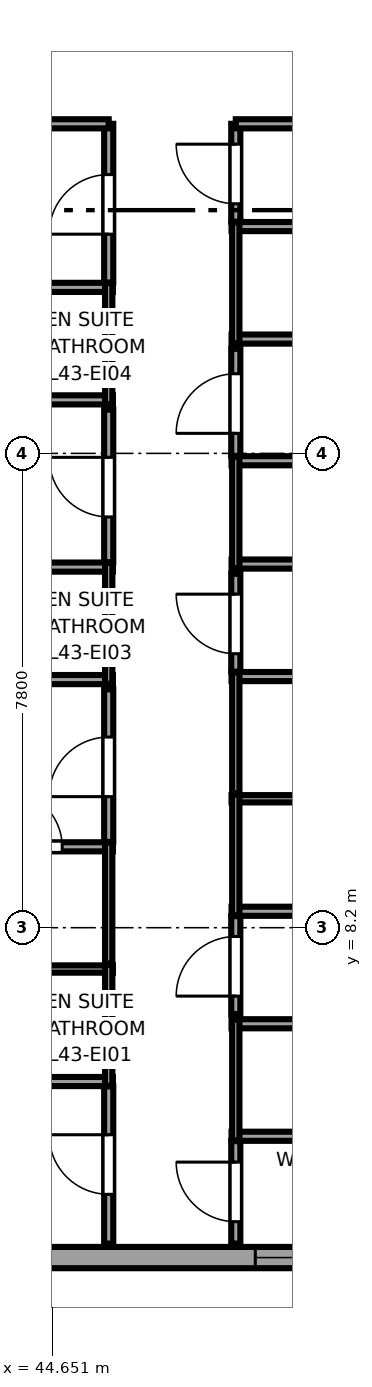
"""IFC4 building model, lengths in metres.
Left out: names, types, materials, properties, quantities, classifications, styles, units other than length and angle.
Written with IfcOpenShell. Run it as: python <this file> out.ifc"""

import sys

from ifc_helpers import new_model, si_unit, direction, frame, frame_2d, origin, place, context, subcontext, project, spatial, rectangle, extrude, source, transform, mapped, element, fill, save


model = new_model("IFC4")
c1 = context("Model", 3, precision=1e-05, world=origin(), true_north=direction((0.0, 1.0)))
c2 = subcontext(c1, "Body", "Model", "MODEL_VIEW")
j1 = project(units=[si_unit("LENGTHUNIT", "METRE"), si_unit("PLANEANGLEUNIT", "RADIAN")], contexts=[c1])
p1 = place(None, origin())
s1 = spatial("IfcSite", under=j1, at=p1, CompositionType="ELEMENT")
p2 = place(p1, origin())
s2 = spatial("IfcBuilding", under=s1, at=p2, CompositionType="ELEMENT")
p3 = place(p2, frame((0.0, 0.0, 164.8)))
s3 = spatial("IfcBuildingStorey", under=s2, at=p3, CompositionType="ELEMENT", Elevation=164.8)
p4 = place(p3, frame((34.375, 2.775, 0.0), z_axis=(0.0, 0.0, 1.0), x_axis=(1.0, 0.0, 0.0)))
e1 = element("IfcWall", 1, at=p4, inside=s3, PredefinedType="SOLIDWALL", context=c2, shape_type="SweptSolid", body=[
    extrude(rectangle(XDim=15.608, YDim=0.35, at=frame_2d((7.804, 0.0))), origin(), (0.0, 0.0, 1.0), 3.37),
])
p5 = place(p4, frame((1.801, 0.0, 0.68)))
e2 = element("IfcOpeningElement", 2, at=p5, cuts=e1, PredefinedType="OPENING", context=c2, shape_type="SweptSolid", body=[
    extrude(rectangle(XDim=2.4, YDim=1.9, at=frame_2d((1.2, 0.95))), frame((0.0, 0.185, 0.0), z_axis=(0.0, -1.0, 0.0), x_axis=(1.0, 0.0, 0.0)), (0.0, 0.0, 1.0), 0.37),
])
p6 = place(p4, frame((13.616, 0.0, 0.62)))
e3 = element("IfcOpeningElement", 3, at=p6, cuts=e1, PredefinedType="OPENING", context=c2, shape_type="SweptSolid", body=[
    extrude(rectangle(XDim=1.5, YDim=1.55, at=frame_2d((0.75, 0.775))), frame((0.0, 0.185, 0.0), z_axis=(0.0, -1.0, 0.0), x_axis=(1.0, 0.0, 0.0)), (0.0, 0.0, 1.0), 0.37),
])
p7 = place(p3, frame((43.06, 5.67, 0.0), z_axis=(0.0, 0.0, 1.0), x_axis=(1.0, 0.0, 0.0)))
e4 = element("IfcWall", 4, at=p7, inside=s3, PredefinedType="PARTITIONING", context=c2, shape_type="SweptSolid", body=[
    extrude(rectangle(XDim=2.59, YDim=0.15, at=frame_2d((1.295, 0.0))), origin(), (0.0, 0.0, 1.0), 3.37),
])
p8 = place(p3, frame((43.06, 7.52, 0.0), z_axis=(0.0, 0.0, 1.0), x_axis=(1.0, 0.0, 0.0)))
e5 = element("IfcWall", 5, at=p8, inside=s3, PredefinedType="PLUMBINGWALL", context=c2, shape_type="SweptSolid", body=[
    extrude(rectangle(XDim=2.59, YDim=0.12, at=frame_2d((1.295, 0.0))), origin(), (0.0, 0.0, 1.0), 3.37),
])
p9 = place(p3, frame((45.58, 5.6, 0.0), z_axis=(0.0, 0.0, 1.0), x_axis=(0.0, 1.0, 0.0)))
e6 = element("IfcWall", 6, at=p9, inside=s3, PredefinedType="PLUMBINGWALL", context=c2, shape_type="SweptSolid", body=[
    extrude(rectangle(XDim=1.99, YDim=0.12, at=frame_2d((0.995, 0.0))), origin(), (0.0, 0.0, 1.0), 3.37),
])
p10 = place(p3, frame((43.06, 9.53, 0.0), z_axis=(0.0, 0.0, 1.0), x_axis=(1.0, 0.0, 0.0)))
e7 = element("IfcWall", 7, at=p10, inside=s3, PredefinedType="PARTITIONING", context=c2, shape_type="SweptSolid", body=[
    extrude(rectangle(XDim=2.59, YDim=0.15, at=frame_2d((1.295, 0.0))), origin(), (0.0, 0.0, 1.0), 3.37),
])
p11 = place(p10, frame((0.835, 0.0, 0.0)))
e8 = element("IfcOpeningElement", 8, at=p11, cuts=e7, PredefinedType="OPENING", context=c2, shape_type="SweptSolid", body=[
    extrude(rectangle(XDim=0.92, YDim=2.01, at=frame_2d((0.46, 1.005))), frame((0.0, 0.085, 0.0), z_axis=(0.0, -1.0, 0.0), x_axis=(1.0, 0.0, 0.0)), (0.0, 0.0, 1.0), 0.17),
])
p12 = place(p3, frame((45.58, 7.61, 0.0), z_axis=(0.0, 0.0, 1.0), x_axis=(0.0, 1.0, 0.0)))
e9 = element("IfcWall", 9, at=p12, inside=s3, PredefinedType="PLUMBINGWALL", context=c2, shape_type="SweptSolid", body=[
    extrude(rectangle(XDim=1.99, YDim=0.12, at=frame_2d((0.995, 0.0))), origin(), (0.0, 0.0, 1.0), 3.001),
])
p13 = place(p3, frame((34.65, 12.28, 0.0), z_axis=(0.0, 0.0, 1.0), x_axis=(1.0, 0.0, 0.0)))
e10 = element("IfcWall", 10, at=p13, inside=s3, PredefinedType="PARTITIONING", context=c2, shape_type="SweptSolid", body=[
    extrude(rectangle(XDim=11.0, YDim=0.15, at=frame_2d((5.5, 0.0))), origin(), (0.0, 0.0, 1.0), 3.37),
])
p14 = place(p3, frame((43.06, 14.13, 0.0), z_axis=(0.0, 0.0, 1.0), x_axis=(1.0, 0.0, 0.0)))
e11 = element("IfcWall", 11, at=p14, inside=s3, PredefinedType="PARTITIONING", context=c2, shape_type="SweptSolid", body=[
    extrude(rectangle(XDim=2.59, YDim=0.15, at=frame_2d((1.295, 0.0))), origin(), (0.0, 0.0, 1.0), 3.37),
])
p15 = place(p3, frame((45.58, 12.21, 0.0), z_axis=(0.0, 0.0, 1.0), x_axis=(0.0, 1.0, 0.0)))
e12 = element("IfcWall", 12, at=p15, inside=s3, PredefinedType="PLUMBINGWALL", context=c2, shape_type="SweptSolid", body=[
    extrude(rectangle(XDim=1.99, YDim=0.12, at=frame_2d((0.995, 0.0))), origin(), (0.0, 0.0, 1.0), 3.001),
])
p16 = place(p3, frame((34.65, 16.88, 0.0), z_axis=(0.0, 0.0, 1.0), x_axis=(1.0, 0.0, 0.0)))
e13 = element("IfcWall", 13, at=p16, inside=s3, PredefinedType="PARTITIONING", context=c2, shape_type="SweptSolid", body=[
    extrude(rectangle(XDim=11.0, YDim=0.15, at=frame_2d((5.5, 0.0))), origin(), (0.0, 0.0, 1.0), 3.37),
])
p17 = place(p3, frame((43.06, 18.73, 0.0), z_axis=(0.0, 0.0, 1.0), x_axis=(1.0, 0.0, 0.0)))
e14 = element("IfcWall", 14, at=p17, inside=s3, PredefinedType="PARTITIONING", context=c2, shape_type="SweptSolid", body=[
    extrude(rectangle(XDim=2.59, YDim=0.15, at=frame_2d((1.295, 0.0))), origin(), (0.0, 0.0, 1.0), 3.37),
])
p18 = place(p3, frame((45.58, 16.81, 0.0), z_axis=(0.0, 0.0, 1.0), x_axis=(0.0, 1.0, 0.0)))
e15 = element("IfcWall", 15, at=p18, inside=s3, PredefinedType="PLUMBINGWALL", context=c2, shape_type="SweptSolid", body=[
    extrude(rectangle(XDim=1.99, YDim=0.12, at=frame_2d((0.995, 0.0))), origin(), (0.0, 0.0, 1.0), 3.001),
])
p19 = place(p3, frame((47.6, 4.77, 0.0), z_axis=(0.0, 0.0, 1.0), x_axis=(1.0, 0.0, 0.0)))
e16 = element("IfcWall", 16, at=p19, inside=s3, PredefinedType="PARTITIONING", context=c2, shape_type="SweptSolid", body=[
    extrude(rectangle(XDim=2.455, YDim=0.15, at=frame_2d((1.228, 0.0))), origin(), (0.0, 0.0, 1.0), 2.832),
])
p20 = place(p3, frame((47.6, 6.62, 0.0), z_axis=(0.0, 0.0, 1.0), x_axis=(1.0, 0.0, 0.0)))
e17 = element("IfcWall", 17, at=p20, inside=s3, PredefinedType="PARTITIONING", context=c2, shape_type="SweptSolid", body=[
    extrude(rectangle(XDim=2.455, YDim=0.15, at=frame_2d((1.228, 0.0))), origin(), (0.0, 0.0, 1.0), 3.37),
])
p21 = place(p3, frame((47.67, 4.7, 0.0), z_axis=(0.0, 0.0, 1.0), x_axis=(0.0, 1.0, 0.0)))
e18 = element("IfcWall", 18, at=p21, inside=s3, PredefinedType="PLUMBINGWALL", context=c2, shape_type="SweptSolid", body=[
    extrude(rectangle(XDim=1.99, YDim=0.12, at=frame_2d((0.995, 0.0))), origin(), (0.0, 0.0, 1.0), 3.37),
])
p22 = place(p3, frame((47.6, 8.47, 0.0), z_axis=(0.0, 0.0, 1.0), x_axis=(1.0, 0.0, 0.0)))
e19 = element("IfcWall", 19, at=p22, inside=s3, PredefinedType="PARTITIONING", context=c2, shape_type="SweptSolid", body=[
    extrude(rectangle(XDim=2.455, YDim=0.15, at=frame_2d((1.228, 0.0))), origin(), (0.0, 0.0, 1.0), 3.37),
])
p23 = place(p3, frame((47.6, 10.32, 0.0), z_axis=(0.0, 0.0, 1.0), x_axis=(1.0, 0.0, 0.0)))
e20 = element("IfcWall", 20, at=p23, inside=s3, PredefinedType="PLUMBINGWALL", context=c2, shape_type="SweptSolid", body=[
    extrude(rectangle(XDim=2.455, YDim=0.12, at=frame_2d((1.228, 0.0))), origin(), (0.0, 0.0, 1.0), 3.37),
])
p24 = place(p3, frame((47.67, 8.4, 0.0), z_axis=(0.0, 0.0, 1.0), x_axis=(0.0, 1.0, 0.0)))
e21 = element("IfcWall", 21, at=p24, inside=s3, PredefinedType="PLUMBINGWALL", context=c2, shape_type="SweptSolid", body=[
    extrude(rectangle(XDim=1.99, YDim=0.12, at=frame_2d((0.995, 0.0))), origin(), (0.0, 0.0, 1.0), 3.37),
])
p25 = place(p3, frame((47.6, 12.33, 0.0), z_axis=(0.0, 0.0, 1.0), x_axis=(1.0, 0.0, 0.0)))
e22 = element("IfcWall", 22, at=p25, inside=s3, PredefinedType="PARTITIONING", context=c2, shape_type="SweptSolid", body=[
    extrude(rectangle(XDim=2.455, YDim=0.15, at=frame_2d((1.228, 0.0))), origin(), (0.0, 0.0, 1.0), 3.37),
])
p26 = place(p3, frame((47.67, 10.41, 0.0), z_axis=(0.0, 0.0, 1.0), x_axis=(0.0, 1.0, 0.0)))
e23 = element("IfcWall", 23, at=p26, inside=s3, PredefinedType="PLUMBINGWALL", context=c2, shape_type="SweptSolid", body=[
    extrude(rectangle(XDim=1.99, YDim=0.12, at=frame_2d((0.995, 0.0))), origin(), (0.0, 0.0, 1.0), 3.37),
])
p27 = place(p3, frame((47.6, 14.18, 0.0), z_axis=(0.0, 0.0, 1.0), x_axis=(1.0, 0.0, 0.0)))
e24 = element("IfcWall", 24, at=p27, inside=s3, PredefinedType="PARTITIONING", context=c2, shape_type="SweptSolid", body=[
    extrude(rectangle(XDim=6.395, YDim=0.15, at=frame_2d((3.198, 0.0))), origin(), (0.0, 0.0, 1.0), 3.37),
])
p28 = place(p3, frame((47.6, 15.879, 0.0), z_axis=(0.0, 0.0, 1.0), x_axis=(1.0, 0.0, 0.0)))
e25 = element("IfcWall", 25, at=p28, inside=s3, PredefinedType="PARTITIONING", context=c2, shape_type="SweptSolid", body=[
    extrude(rectangle(XDim=3.226, YDim=0.15, at=frame_2d((1.613, 0.0))), origin(), (0.0, 0.0, 1.0), 2.758),
])
p29 = place(p3, frame((47.67, 14.11, 0.0), z_axis=(0.0, 0.0, 1.0), x_axis=(0.0, 1.0, 0.0)))
e26 = element("IfcWall", 26, at=p29, inside=s3, PredefinedType="PLUMBINGWALL", context=c2, shape_type="SweptSolid", body=[
    extrude(rectangle(XDim=1.839, YDim=0.12, at=frame_2d((0.919, 0.0))), origin(), (0.0, 0.0, 1.0), 3.37),
])
p30 = place(p3, frame((47.6, 17.88, 0.0), z_axis=(0.0, 0.0, 1.0), x_axis=(1.0, 0.0, 0.0)))
e27 = element("IfcWall", 27, at=p30, inside=s3, PredefinedType="PARTITIONING", context=c2, shape_type="SweptSolid", body=[
    extrude(rectangle(XDim=6.395, YDim=0.15, at=frame_2d((3.198, 0.0))), origin(), (0.0, 0.0, 1.0), 3.37),
])
p31 = place(p3, frame((47.6, 19.73, 0.0), z_axis=(0.0, 0.0, 1.0), x_axis=(1.0, 0.0, 0.0)))
e28 = element("IfcWall", 28, at=p31, inside=s3, PredefinedType="PARTITIONING", context=c2, shape_type="SweptSolid", body=[
    extrude(rectangle(XDim=2.455, YDim=0.15, at=frame_2d((1.228, 0.0))), origin(), (0.0, 0.0, 1.0), 3.37),
])
p32 = place(p3, frame((47.67, 17.81, 0.0), z_axis=(0.0, 0.0, 1.0), x_axis=(0.0, 1.0, 0.0)))
e29 = element("IfcWall", 29, at=p32, inside=s3, PredefinedType="PLUMBINGWALL", context=c2, shape_type="SweptSolid", body=[
    extrude(rectangle(XDim=1.99, YDim=0.12, at=frame_2d((0.995, 0.0))), origin(), (0.0, 0.0, 1.0), 3.37),
])
p33 = place(p3, frame((45.58, 3.005, 0.0), z_axis=(0.0, 0.0, 1.0), x_axis=(0.0, 1.0, 0.0)))
e30 = element("IfcWall", 30, at=p33, inside=s3, PredefinedType="PARTITIONING", context=c2, shape_type="SweptSolid", body=[
    extrude(rectangle(XDim=2.585, YDim=0.15, at=frame_2d((1.292, 0.0))), origin(), (0.0, 0.0, 1.0), 3.37),
])
p34 = place(p33, frame((0.81, 0.0, 0.0)))
e31 = element("IfcOpeningElement", 31, at=p34, cuts=e30, PredefinedType="OPENING", context=c2, shape_type="SweptSolid", body=[
    extrude(rectangle(XDim=0.98, YDim=2.12, at=frame_2d((0.49, 1.06))), frame((0.0, 0.085, 0.0), z_axis=(0.0, -1.0, 0.0), x_axis=(1.0, 0.0, 0.0)), (0.0, 0.0, 1.0), 0.17),
])
p35 = place(p3, frame((45.58, 9.61, 0.0), z_axis=(0.0, 0.0, 1.0), x_axis=(0.0, 1.0, 0.0)))
e32 = element("IfcWall", 32, at=p35, inside=s3, PredefinedType="PARTITIONING", context=c2, shape_type="SweptSolid", body=[
    extrude(rectangle(XDim=2.51, YDim=0.15, at=frame_2d((1.255, 0.0))), origin(), (0.0, 0.0, 1.0), 3.001),
])
p36 = place(p35, frame((0.745, 0.0, 0.0)))
e33 = element("IfcOpeningElement", 33, at=p36, cuts=e32, PredefinedType="OPENING", context=c2, shape_type="SweptSolid", body=[
    extrude(rectangle(XDim=0.98, YDim=2.12, at=frame_2d((0.49, 1.06))), frame((0.0, 0.085, 0.0), z_axis=(0.0, -1.0, 0.0), x_axis=(1.0, 0.0, 0.0)), (0.0, 0.0, 1.0), 0.17),
])
p37 = place(p3, frame((45.58, 14.21, 0.0), z_axis=(0.0, 0.0, 1.0), x_axis=(0.0, 1.0, 0.0)))
e34 = element("IfcWall", 34, at=p37, inside=s3, PredefinedType="PARTITIONING", context=c2, shape_type="SweptSolid", body=[
    extrude(rectangle(XDim=2.51, YDim=0.15, at=frame_2d((1.255, 0.0))), origin(), (0.0, 0.0, 1.0), 3.001),
])
p38 = place(p37, frame((0.745, 0.0, 0.0)))
e35 = element("IfcOpeningElement", 35, at=p38, cuts=e34, PredefinedType="OPENING", context=c2, shape_type="SweptSolid", body=[
    extrude(rectangle(XDim=0.98, YDim=2.12, at=frame_2d((0.49, 1.06))), frame((0.0, 0.085, 0.0), z_axis=(0.0, -1.0, 0.0), x_axis=(1.0, 0.0, 0.0)), (0.0, 0.0, 1.0), 0.17),
])
p39 = place(p3, frame((45.58, 18.81, 0.0), z_axis=(0.0, 0.0, 1.0), x_axis=(0.0, 1.0, 0.0)))
e36 = element("IfcWall", 36, at=p39, inside=s3, PredefinedType="PARTITIONING", context=c2, shape_type="SweptSolid", body=[
    extrude(rectangle(XDim=2.61, YDim=0.15, at=frame_2d((1.305, 0.0))), origin(), (0.0, 0.0, 1.0), 3.001),
])
p40 = place(p39, frame((0.795, 0.0, 0.0)))
e37 = element("IfcOpeningElement", 37, at=p40, cuts=e36, PredefinedType="OPENING", context=c2, shape_type="SweptSolid", body=[
    extrude(rectangle(XDim=0.98, YDim=2.12, at=frame_2d((0.49, 1.06))), frame((0.0, 0.085, 0.0), z_axis=(0.0, -1.0, 0.0), x_axis=(1.0, 0.0, 0.0)), (0.0, 0.0, 1.0), 0.17),
])
p41 = place(p3, frame((34.65, 21.42, 0.0), z_axis=(0.0, 0.0, 1.0), x_axis=(1.0, 0.0, 0.0)))
e38 = element("IfcWall", 38, at=p41, inside=s3, PredefinedType="PARTITIONING", context=c2, shape_type="SweptSolid", body=[
    extrude(rectangle(XDim=10.93, YDim=0.15, at=frame_2d((5.465, 0.0))), origin(), (0.0, 0.0, 1.0), 3.37),
])
p42 = place(p3, frame((47.67, 3.005, 0.0), z_axis=(0.0, 0.0, 1.0), x_axis=(0.0, 1.0, 0.0)))
e39 = element("IfcWall", 39, at=p42, inside=s3, PredefinedType="PARTITIONING", context=c2, shape_type="SweptSolid", body=[
    extrude(rectangle(XDim=1.685, YDim=0.15, at=frame_2d((0.843, 0.0))), origin(), (0.0, 0.0, 1.0), 3.37),
])
p43 = place(p42, frame((0.36, 0.0, 0.0)))
e40 = element("IfcOpeningElement", 40, at=p43, cuts=e39, PredefinedType="OPENING", context=c2, shape_type="SweptSolid", body=[
    extrude(rectangle(XDim=0.98, YDim=2.12, at=frame_2d((0.49, 1.06))), frame((0.0, 0.085, 0.0), z_axis=(0.0, -1.0, 0.0), x_axis=(1.0, 0.0, 0.0)), (0.0, 0.0, 1.0), 0.17),
])
p44 = place(p3, frame((47.67, 6.78, 0.0), z_axis=(0.0, 0.0, 1.0), x_axis=(0.0, 1.0, 0.0)))
e41 = element("IfcWall", 41, at=p44, inside=s3, PredefinedType="PARTITIONING", context=c2, shape_type="SweptSolid", body=[
    extrude(rectangle(XDim=1.61, YDim=0.15, at=frame_2d((0.805, 0.0))), origin(), (0.0, 0.0, 1.0), 3.37),
])
p45 = place(p44, frame((0.295, 0.0, 0.0)))
e42 = element("IfcOpeningElement", 42, at=p45, cuts=e41, PredefinedType="OPENING", context=c2, shape_type="SweptSolid", body=[
    extrude(rectangle(XDim=0.98, YDim=2.12, at=frame_2d((0.49, 1.06))), frame((0.0, 0.085, 0.0), z_axis=(0.0, -1.0, 0.0), x_axis=(1.0, 0.0, 0.0)), (0.0, 0.0, 1.0), 0.17),
])
p46 = place(p3, frame((47.67, 12.41, 0.0), z_axis=(0.0, 0.0, 1.0), x_axis=(0.0, 1.0, 0.0)))
e43 = element("IfcWall", 43, at=p46, inside=s3, PredefinedType="PARTITIONING", context=c2, shape_type="SweptSolid", body=[
    extrude(rectangle(XDim=1.61, YDim=0.15, at=frame_2d((0.805, 0.0))), origin(), (0.0, 0.0, 1.0), 3.37),
])
p47 = place(p46, frame((0.295, 0.0, 0.0)))
e44 = element("IfcOpeningElement", 44, at=p47, cuts=e43, PredefinedType="OPENING", context=c2, shape_type="SweptSolid", body=[
    extrude(rectangle(XDim=0.98, YDim=2.12, at=frame_2d((0.49, 1.06))), frame((0.0, 0.085, 0.0), z_axis=(0.0, -1.0, 0.0), x_axis=(1.0, 0.0, 0.0)), (0.0, 0.0, 1.0), 0.17),
])
p48 = place(p3, frame((47.67, 15.959, 0.0), z_axis=(0.0, 0.0, 1.0), x_axis=(0.0, 1.0, 0.0)))
e45 = element("IfcWall", 45, at=p48, inside=s3, PredefinedType="PARTITIONING", context=c2, shape_type="SweptSolid", body=[
    extrude(rectangle(XDim=1.761, YDim=0.15, at=frame_2d((0.88, 0.0))), origin(), (0.0, 0.0, 1.0), 3.37),
])
p49 = place(p48, frame((0.371, 0.0, 0.0)))
e46 = element("IfcOpeningElement", 46, at=p49, cuts=e45, PredefinedType="OPENING", context=c2, shape_type="SweptSolid", body=[
    extrude(rectangle(XDim=0.98, YDim=2.12, at=frame_2d((0.49, 1.06))), frame((0.0, 0.085, 0.0), z_axis=(0.0, -1.0, 0.0), x_axis=(1.0, 0.0, 0.0)), (0.0, 0.0, 1.0), 0.17),
])
p50 = place(p3, frame((47.67, 19.81, 0.0), z_axis=(0.0, 0.0, 1.0), x_axis=(0.0, 1.0, 0.0)))
e47 = element("IfcWall", 47, at=p50, inside=s3, PredefinedType="PARTITIONING", context=c2, shape_type="SweptSolid", body=[
    extrude(rectangle(XDim=1.61, YDim=0.15, at=frame_2d((0.805, 0.0))), origin(), (0.0, 0.0, 1.0), 3.37),
])
p51 = place(p50, frame((0.295, 0.0, 0.0)))
e48 = element("IfcOpeningElement", 48, at=p51, cuts=e47, PredefinedType="OPENING", context=c2, shape_type="SweptSolid", body=[
    extrude(rectangle(XDim=0.98, YDim=2.12, at=frame_2d((0.49, 1.06))), frame((0.0, 0.085, 0.0), z_axis=(0.0, -1.0, 0.0), x_axis=(1.0, 0.0, 0.0)), (0.0, 0.0, 1.0), 0.17),
])
p52 = place(p3, frame((47.67, 21.42, 0.0), z_axis=(0.0, 0.0, 1.0), x_axis=(1.0, 0.0, 0.0)))
e49 = element("IfcWall", 49, at=p52, inside=s3, PredefinedType="PARTITIONING", context=c2, shape_type="SweptSolid", body=[
    extrude(rectangle(XDim=6.325, YDim=0.15, at=frame_2d((3.163, 0.0))), origin(), (0.0, 0.0, 1.0), 3.37),
])
m1 = source(origin(), c2, "Body", "SweptSolid", [
    extrude(rectangle(XDim=1.5, YDim=1.55, at=frame_2d((0.75, 0.775))), frame((0.0, 0.09, 0.0), z_axis=(0.0, -1.0, 0.0), x_axis=(1.0, 0.0, 0.0)), (0.0, 0.0, 1.0), 0.06),
])
p53 = place(p6, origin())
e50 = element("IfcWindow", 50, at=p53, inside=s3, PartitioningType="SINGLE_PANEL", PredefinedType="WINDOW", context=c2, shape_type="MappedRepresentation", body=[
    mapped(m1, transform((0.0, 0.0, 0.0), x_axis=(1.0, 0.0, 0.0), y_axis=(0.0, 1.0, 0.0), z_axis=(0.0, 0.0, 1.0), scale=1.0)),
])
fill(e3, e50)
m2 = source(origin(), c2, "Body", "SweptSolid", [
    extrude(rectangle(XDim=0.92, YDim=2.01, at=frame_2d((0.46, 1.005))), frame((0.0, 0.025, 0.0), z_axis=(0.0, -1.0, 0.0), x_axis=(1.0, 0.0, 0.0)), (0.0, 0.0, 1.0), 0.05),
])
p54 = place(p11, origin())
e51 = element("IfcDoor", 51, at=p54, inside=s3, OperationType="SINGLE_SWING_LEFT", PredefinedType="DOOR", context=c2, shape_type="MappedRepresentation", body=[
    mapped(m2, transform((0.0, 0.0, 0.0), x_axis=(1.0, 0.0, 0.0), y_axis=(0.0, 1.0, 0.0), z_axis=(0.0, 0.0, 1.0), scale=1.0)),
])
fill(e8, e51)
m3 = source(origin(), c2, "Body", "SweptSolid", [
    extrude(rectangle(XDim=0.98, YDim=2.12, at=frame_2d((0.49, 1.06))), frame((0.0, 0.025, 0.0), z_axis=(0.0, -1.0, 0.0), x_axis=(1.0, 0.0, 0.0)), (0.0, 0.0, 1.0), 0.05),
])
p55 = place(p34, origin())
e52 = element("IfcDoor", 52, at=p55, inside=s3, OperationType="SINGLE_SWING_RIGHT", PredefinedType="DOOR", context=c2, shape_type="MappedRepresentation", body=[
    mapped(m3, transform((0.0, 0.0, 0.0), x_axis=(1.0, 0.0, 0.0), y_axis=(0.0, 1.0, 0.0), z_axis=(0.0, 0.0, 1.0), scale=1.0)),
])
fill(e31, e52)
p56 = place(p36, origin())
e53 = element("IfcDoor", 53, at=p56, inside=s3, OperationType="SINGLE_SWING_LEFT", PredefinedType="DOOR", context=c2, shape_type="MappedRepresentation", body=[
    mapped(m3, transform((0.0, 0.0, 0.0), x_axis=(1.0, 0.0, 0.0), y_axis=(0.0, 1.0, 0.0), z_axis=(0.0, 0.0, 1.0), scale=1.0)),
])
fill(e33, e53)
p57 = place(p38, origin())
e54 = element("IfcDoor", 54, at=p57, inside=s3, OperationType="SINGLE_SWING_RIGHT", PredefinedType="DOOR", context=c2, shape_type="MappedRepresentation", body=[
    mapped(m3, transform((0.0, 0.0, 0.0), x_axis=(1.0, 0.0, 0.0), y_axis=(0.0, 1.0, 0.0), z_axis=(0.0, 0.0, 1.0), scale=1.0)),
])
fill(e35, e54)
p58 = place(p40, origin())
e55 = element("IfcDoor", 55, at=p58, inside=s3, OperationType="SINGLE_SWING_LEFT", PredefinedType="DOOR", context=c2, shape_type="MappedRepresentation", body=[
    mapped(m3, transform((0.0, 0.0, 0.0), x_axis=(1.0, 0.0, 0.0), y_axis=(0.0, 1.0, 0.0), z_axis=(0.0, 0.0, 1.0), scale=1.0)),
])
fill(e37, e55)
p59 = place(p43, origin())
e56 = element("IfcDoor", 56, at=p59, inside=s3, OperationType="SINGLE_SWING_RIGHT", PredefinedType="DOOR", context=c2, shape_type="MappedRepresentation", body=[
    mapped(m3, transform((0.0, 0.0, 0.0), x_axis=(1.0, 0.0, 0.0), y_axis=(0.0, 1.0, 0.0), z_axis=(0.0, 0.0, 1.0), scale=1.0)),
])
fill(e40, e56)
p60 = place(p45, origin())
e57 = element("IfcDoor", 57, at=p60, inside=s3, OperationType="SINGLE_SWING_LEFT", PredefinedType="DOOR", context=c2, shape_type="MappedRepresentation", body=[
    mapped(m3, transform((0.0, 0.0, 0.0), x_axis=(1.0, 0.0, 0.0), y_axis=(0.0, 1.0, 0.0), z_axis=(0.0, 0.0, 1.0), scale=1.0)),
])
fill(e42, e57)
p61 = place(p47, origin())
e58 = element("IfcDoor", 58, at=p61, inside=s3, OperationType="SINGLE_SWING_RIGHT", PredefinedType="DOOR", context=c2, shape_type="MappedRepresentation", body=[
    mapped(m3, transform((0.0, 0.0, 0.0), x_axis=(1.0, 0.0, 0.0), y_axis=(0.0, 1.0, 0.0), z_axis=(0.0, 0.0, 1.0), scale=1.0)),
])
fill(e44, e58)
p62 = place(p49, origin())
e59 = element("IfcDoor", 59, at=p62, inside=s3, OperationType="SINGLE_SWING_LEFT", PredefinedType="DOOR", context=c2, shape_type="MappedRepresentation", body=[
    mapped(m3, transform((0.0, 0.0, 0.0), x_axis=(1.0, 0.0, 0.0), y_axis=(0.0, 1.0, 0.0), z_axis=(0.0, 0.0, 1.0), scale=1.0)),
])
fill(e46, e59)
p63 = place(p51, origin())
e60 = element("IfcDoor", 60, at=p63, inside=s3, OperationType="SINGLE_SWING_RIGHT", PredefinedType="DOOR", context=c2, shape_type="MappedRepresentation", body=[
    mapped(m3, transform((0.0, 0.0, 0.0), x_axis=(1.0, 0.0, 0.0), y_axis=(0.0, 1.0, 0.0), z_axis=(0.0, 0.0, 1.0), scale=1.0)),
])
fill(e48, e60)
save(model, sys.argv[1])
